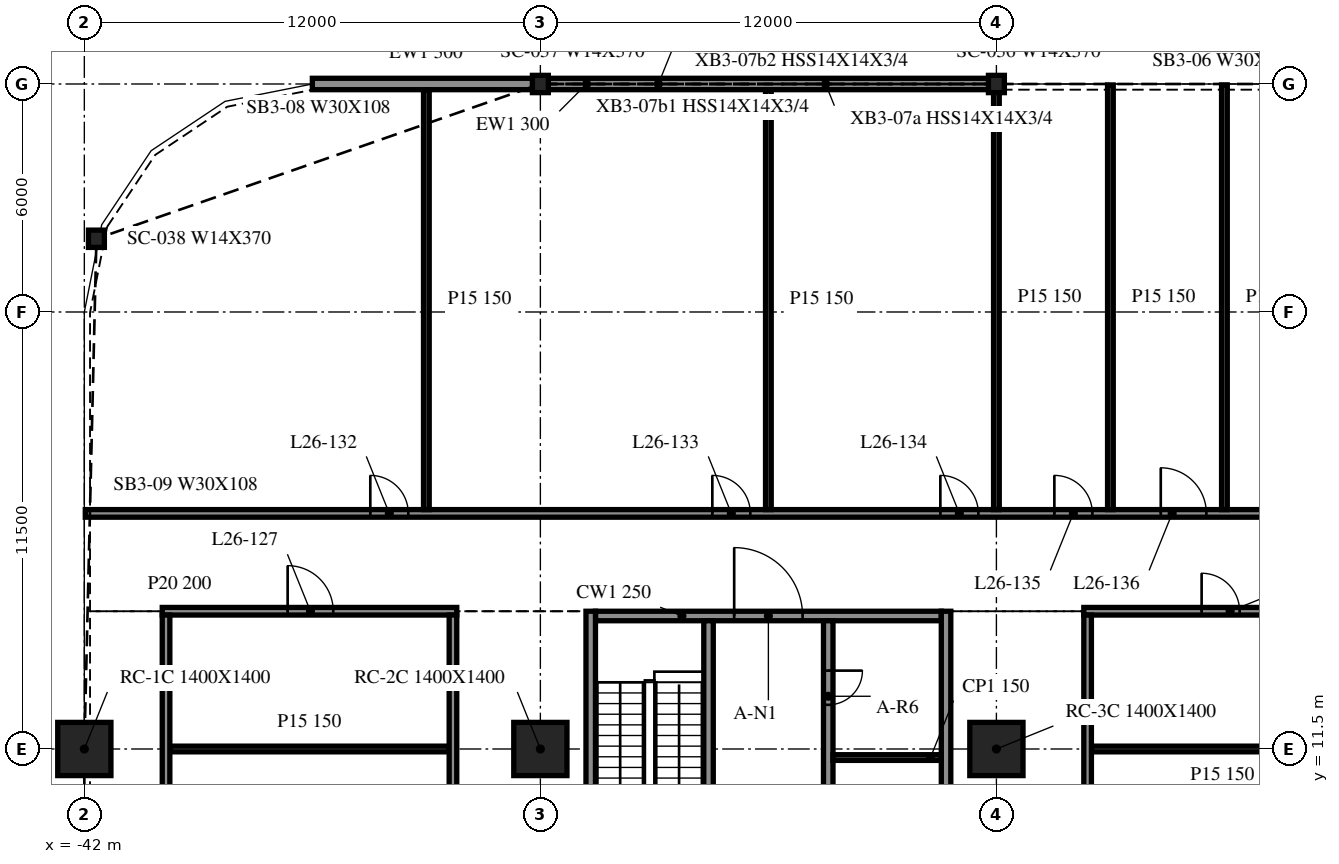
"""IFC4 building model, lengths in metres.
Left out: names, types, materials, properties, quantities, classifications, styles, units other than length and angle.
Written with IfcOpenShell. Run it as: python <this file> out.ifc"""

import sys

from ifc_helpers import new_model, si_unit, direction, frame, frame_2d, origin, origin_2d, place, context, subcontext, project, spatial, rectangle, i_section, extrude, element, fill, save


model = new_model("IFC4")
c1 = context("Model", 3, precision=1e-05, world=origin(), true_north=direction((0.0, 1.0)))
c2 = subcontext(c1, "Body", "Model", "MODEL_VIEW")
j1 = project(units=[si_unit("LENGTHUNIT", "METRE"), si_unit("PLANEANGLEUNIT", "RADIAN")], contexts=[c1])
p1 = place(None, origin())
s1 = spatial("IfcSite", under=j1, at=p1, CompositionType="ELEMENT")
p2 = place(p1, origin())
s2 = spatial("IfcBuilding", under=s1, at=p2, CompositionType="ELEMENT")
p3 = place(p2, frame((0.0, 0.0, 113.5)))
s3 = spatial("IfcBuildingStorey", under=s2, at=p3, CompositionType="ELEMENT", Elevation=113.5)
for number, where, z_axis, x_axis in (
    (1, (-42.0, 11.5, -0.34), (0.0, 0.0, 1.0), (1.0, 0.0, 0.0)),
    (2, (-30.0, 11.5, -0.34), (0.0, 0.0, 1.0), (1.0, 0.0, 0.0)),
    (3, (-18.0, 11.5, -0.34), (0.0, 0.0, 1.0), (1.0, 0.0, 0.0)),
):
    element("IfcColumn", number, at=place(p3, frame(where, z_axis=z_axis, x_axis=x_axis)), inside=s3, PredefinedType="COLUMN", context=c2, shape_type="SweptSolid", body=[
        extrude(rectangle(XDim=1.4, YDim=1.4, at=origin_2d()), origin(), (0.0, 0.0, 1.0), 3.89),
    ])
for number, where, z_axis, x_axis in (
    (4, (-18.0, 29.0, -0.34), (0.0, 0.0, 1.0), (1.0, 0.0, 0.0)),
    (5, (-30.0, 29.0, -0.34), (0.0, 0.0, 1.0), (1.0, 0.0, 0.0)),
    (6, (-41.682, 24.927, -0.34), (0.0, 0.0, 1.0), (1.0, 0.0, 0.0)),
):
    element("IfcColumn", number, at=place(p3, frame(where, z_axis=z_axis, x_axis=x_axis)), inside=s3, PredefinedType="COLUMN", context=c2, shape_type="SweptSolid", body=[
        extrude(i_section(OverallWidth=0.419, OverallDepth=0.455, WebThickness=0.042, FlangeThickness=0.068, at=origin_2d()), origin(), (0.0, 0.0, 1.0), 3.89),
    ])
p4 = place(p3, frame((-18.021, 29.0, 0.0), z_axis=(0.0, 0.0, 1.0), x_axis=(-1.0, 0.0, 0.0)))
e7 = element("IfcWall", 7, at=p4, inside=s3, PredefinedType="NOTDEFINED", context=c2, shape_type="SweptSolid", body=[
    extrude(rectangle(XDim=11.958, YDim=0.3, at=frame_2d((5.979, 0.0))), origin(), (0.0, 0.0, 1.0), 3.55),
])
p5 = place(p3, frame((-30.021, 29.0, 0.0), z_axis=(0.0, 0.0, 1.0), x_axis=(-1.0, 0.0, 0.0)))
e8 = element("IfcWall", 8, at=p5, inside=s3, PredefinedType="NOTDEFINED", context=c2, shape_type="SweptSolid", body=[
    extrude(rectangle(XDim=5.979, YDim=0.3, at=frame_2d((2.99, 0.0))), origin(), (0.0, 0.0, 1.0), 3.55),
])
for number, where, z_axis, x_axis in (
    (9, (-28.675, 15.125, 0.0), (0.0, 0.0, 1.0), (0.0, -1.0, 0.0)),
    (10, (-19.325, -9.125, 0.0), (0.0, 0.0, 1.0), (0.0, 1.0, 0.0)),
):
    element("IfcWall", number, at=place(p3, frame(where, z_axis=z_axis, x_axis=x_axis)), inside=s3, PredefinedType="SOLIDWALL", context=c2, shape_type="SweptSolid", body=[
        extrude(rectangle(XDim=24.25, YDim=0.25, at=frame_2d((12.125, 0.0))), origin(), (0.0, 0.0, 1.0), 3.55),
    ])
p6 = place(p3, frame((-28.55, 15.0, 0.0), z_axis=(0.0, 0.0, 1.0), x_axis=(1.0, 0.0, 0.0)))
e11 = element("IfcWall", 11, at=p6, inside=s3, PredefinedType="SOLIDWALL", context=c2, shape_type="SweptSolid", body=[
    extrude(rectangle(XDim=9.1, YDim=0.25, at=frame_2d((4.55, 0.0))), origin(), (0.0, 0.0, 1.0), 3.55),
])
p7 = place(p6, frame((3.65, 0.0, 0.0)))
e12 = element("IfcOpeningElement", 12, at=p7, cuts=e11, PredefinedType="OPENING", context=c2, shape_type="SweptSolid", body=[
    extrude(rectangle(XDim=1.8, YDim=2.1, at=frame_2d((0.9, 1.05))), frame((0.0, 0.135, 0.0), z_axis=(0.0, -1.0, 0.0), x_axis=(1.0, 0.0, 0.0)), (0.0, 0.0, 1.0), 0.27),
])
p8 = place(p3, frame((-25.575, 14.875, 0.0), z_axis=(0.0, 0.0, 1.0), x_axis=(0.0, -1.0, 0.0)))
e13 = element("IfcWall", 13, at=p8, inside=s3, PredefinedType="SOLIDWALL", context=c2, shape_type="SweptSolid", body=[
    extrude(rectangle(XDim=6.25, YDim=0.25, at=frame_2d((3.125, 0.0))), origin(), (0.0, 0.0, 1.0), 3.55),
])
p9 = place(p8, frame((4.85, 0.0, 0.0)))
e14 = element("IfcOpeningElement", 14, at=p9, cuts=e13, PredefinedType="OPENING", context=c2, shape_type="SweptSolid", body=[
    extrude(rectangle(XDim=1.0, YDim=2.1, at=frame_2d((0.5, 1.05))), frame((0.0, 0.135, 0.0), z_axis=(0.0, -1.0, 0.0), x_axis=(1.0, 0.0, 0.0)), (0.0, 0.0, 1.0), 0.27),
])
p10 = place(p3, frame((-22.425, 14.875, 0.0), z_axis=(0.0, 0.0, 1.0), x_axis=(0.0, -1.0, 0.0)))
e15 = element("IfcWall", 15, at=p10, inside=s3, PredefinedType="SOLIDWALL", context=c2, shape_type="SweptSolid", body=[
    extrude(rectangle(XDim=23.75, YDim=0.25, at=frame_2d((11.875, 0.0))), origin(), (0.0, 0.0, 1.0), 3.55),
])
p11 = place(p10, frame((15.45, 0.0, 0.0)))
e16 = element("IfcOpeningElement", 16, at=p11, cuts=e15, PredefinedType="OPENING", context=c2, shape_type="SweptSolid", body=[
    extrude(rectangle(XDim=1.1, YDim=2.1, at=frame_2d((0.55, 1.05))), frame((0.0, 0.135, 0.0), z_axis=(0.0, -1.0, 0.0), x_axis=(1.0, 0.0, 0.0)), (0.0, 0.0, 1.0), 0.27),
])
p12 = place(p10, frame((12.7, 0.0, 0.0)))
e17 = element("IfcOpeningElement", 17, at=p12, cuts=e15, PredefinedType="OPENING", context=c2, shape_type="SweptSolid", body=[
    extrude(rectangle(XDim=1.1, YDim=2.1, at=frame_2d((0.55, 1.05))), frame((0.0, 0.135, 0.0), z_axis=(0.0, -1.0, 0.0), x_axis=(1.0, 0.0, 0.0)), (0.0, 0.0, 1.0), 0.27),
])
p13 = place(p10, frame((21.337, 0.0, 0.0)))
e18 = element("IfcOpeningElement", 18, at=p13, cuts=e15, PredefinedType="OPENING", context=c2, shape_type="SweptSolid", body=[
    extrude(rectangle(XDim=0.9, YDim=2.1, at=frame_2d((0.45, 1.05))), frame((0.0, 0.135, 0.0), z_axis=(0.0, -1.0, 0.0), x_axis=(1.0, 0.0, 0.0)), (0.0, 0.0, 1.0), 0.27),
])
p14 = place(p10, frame((18.262, 0.0, 0.0)))
e19 = element("IfcOpeningElement", 19, at=p14, cuts=e15, PredefinedType="OPENING", context=c2, shape_type="SweptSolid", body=[
    extrude(rectangle(XDim=0.9, YDim=2.1, at=frame_2d((0.45, 1.05))), frame((0.0, 0.135, 0.0), z_axis=(0.0, -1.0, 0.0), x_axis=(1.0, 0.0, 0.0)), (0.0, 0.0, 1.0), 0.27),
])
p15 = place(p10, frame((4.387, 0.0, 0.0)))
e20 = element("IfcOpeningElement", 20, at=p15, cuts=e15, PredefinedType="OPENING", context=c2, shape_type="SweptSolid", body=[
    extrude(rectangle(XDim=0.9, YDim=2.1, at=frame_2d((0.45, 1.05))), frame((0.0, 0.135, 0.0), z_axis=(0.0, -1.0, 0.0), x_axis=(1.0, 0.0, 0.0)), (0.0, 0.0, 1.0), 0.27),
])
p16 = place(p10, frame((1.312, 0.0, 0.0)))
e21 = element("IfcOpeningElement", 21, at=p16, cuts=e15, PredefinedType="OPENING", context=c2, shape_type="SweptSolid", body=[
    extrude(rectangle(XDim=0.9, YDim=2.1, at=frame_2d((0.45, 1.05))), frame((0.0, 0.135, 0.0), z_axis=(0.0, -1.0, 0.0), x_axis=(1.0, 0.0, 0.0)), (0.0, 0.0, 1.0), 0.27),
])
p17 = place(p3, frame((-22.3, 11.275, 0.0), z_axis=(0.0, 0.0, 1.0), x_axis=(1.0, 0.0, 0.0)))
e22 = element("IfcWall", 22, at=p17, inside=s3, PredefinedType="PARTITIONING", context=c2, shape_type="SweptSolid", body=[
    extrude(rectangle(XDim=2.85, YDim=0.15, at=frame_2d((1.425, 0.0))), origin(), (0.0, 0.0, 1.0), 3.55),
])
p18 = place(p3, frame((-39.75, 11.5, 0.0), z_axis=(0.0, 0.0, 1.0), x_axis=(1.0, 0.0, 0.0)))
e23 = element("IfcWall", 23, at=p18, inside=s3, PredefinedType="PARTITIONING", context=c2, shape_type="SweptSolid", body=[
    extrude(rectangle(XDim=7.35, YDim=0.15, at=frame_2d((3.675, 0.0))), origin(), (0.0, 0.0, 1.0), 2.551),
])
p19 = place(p3, frame((-15.5, 11.5, 0.0), z_axis=(0.0, 0.0, 1.0), x_axis=(1.0, 0.0, 0.0)))
e24 = element("IfcWall", 24, at=p19, inside=s3, PredefinedType="PARTITIONING", context=c2, shape_type="SweptSolid", body=[
    extrude(rectangle(XDim=6.9, YDim=0.15, at=frame_2d((3.45, 0.0))), origin(), (0.0, 0.0, 1.0), 3.55),
])
p20 = place(p3, frame((-39.95, 15.125, 0.0), z_axis=(0.0, 0.0, 1.0), x_axis=(1.0, 0.0, 0.0)))
e25 = element("IfcWall", 25, at=p20, inside=s3, PredefinedType="PARTITIONING", context=c2, shape_type="SweptSolid", body=[
    extrude(rectangle(XDim=7.75, YDim=0.2, at=frame_2d((3.875, 0.0))), origin(), (0.0, 0.0, 1.0), 3.55),
])
p21 = place(p20, frame((3.3, 0.0, 0.0)))
e26 = element("IfcOpeningElement", 26, at=p21, cuts=e25, PredefinedType="OPENING", context=c2, shape_type="SweptSolid", body=[
    extrude(rectangle(XDim=1.2, YDim=2.1, at=frame_2d((0.6, 1.05))), frame((0.0, 0.11, 0.0), z_axis=(0.0, -1.0, 0.0), x_axis=(1.0, 0.0, 0.0)), (0.0, 0.0, 1.0), 0.22),
])
p22 = place(p3, frame((-15.7, 15.125, 0.0), z_axis=(0.0, 0.0, 1.0), x_axis=(1.0, 0.0, 0.0)))
e27 = element("IfcWall", 27, at=p22, inside=s3, PredefinedType="PARTITIONING", context=c2, shape_type="SweptSolid", body=[
    extrude(rectangle(XDim=7.3, YDim=0.2, at=frame_2d((3.65, 0.0))), origin(), (0.0, 0.0, 1.0), 3.55),
])
p23 = place(p22, frame((3.1, 0.0, 0.0)))
e28 = element("IfcOpeningElement", 28, at=p23, cuts=e27, PredefinedType="OPENING", context=c2, shape_type="SweptSolid", body=[
    extrude(rectangle(XDim=1.0, YDim=2.1, at=frame_2d((0.5, 1.05))), frame((0.0, 0.11, 0.0), z_axis=(0.0, -1.0, 0.0), x_axis=(1.0, 0.0, 0.0)), (0.0, 0.0, 1.0), 0.22),
])
p24 = place(p3, frame((-41.975, 17.7, 0.0), z_axis=(0.0, 0.0, 1.0), x_axis=(1.0, 0.0, 0.0)))
e29 = element("IfcWall", 29, at=p24, inside=s3, PredefinedType="PARTITIONING", context=c2, shape_type="SweptSolid", body=[
    extrude(rectangle(XDim=95.95, YDim=0.2, at=frame_2d((47.975, 0.0))), origin(), (0.0, 0.0, 1.0), 3.55),
])
p25 = place(p24, frame((7.5, 0.0, 0.0)))
e30 = element("IfcOpeningElement", 30, at=p25, cuts=e29, PredefinedType="OPENING", context=c2, shape_type="SweptSolid", body=[
    extrude(rectangle(XDim=1.0, YDim=2.1, at=frame_2d((0.5, 1.05))), frame((0.0, 0.11, 0.0), z_axis=(0.0, -1.0, 0.0), x_axis=(1.0, 0.0, 0.0)), (0.0, 0.0, 1.0), 0.22),
])
p26 = place(p24, frame((16.5, 0.0, 0.0)))
e31 = element("IfcOpeningElement", 31, at=p26, cuts=e29, PredefinedType="OPENING", context=c2, shape_type="SweptSolid", body=[
    extrude(rectangle(XDim=1.0, YDim=2.1, at=frame_2d((0.5, 1.05))), frame((0.0, 0.11, 0.0), z_axis=(0.0, -1.0, 0.0), x_axis=(1.0, 0.0, 0.0)), (0.0, 0.0, 1.0), 0.22),
])
p27 = place(p24, frame((22.5, 0.0, 0.0)))
e32 = element("IfcOpeningElement", 32, at=p27, cuts=e29, PredefinedType="OPENING", context=c2, shape_type="SweptSolid", body=[
    extrude(rectangle(XDim=1.0, YDim=2.1, at=frame_2d((0.5, 1.05))), frame((0.0, 0.11, 0.0), z_axis=(0.0, -1.0, 0.0), x_axis=(1.0, 0.0, 0.0)), (0.0, 0.0, 1.0), 0.22),
])
p28 = place(p24, frame((25.5, 0.0, 0.0)))
e33 = element("IfcOpeningElement", 33, at=p28, cuts=e29, PredefinedType="OPENING", context=c2, shape_type="SweptSolid", body=[
    extrude(rectangle(XDim=1.0, YDim=2.1, at=frame_2d((0.5, 1.05))), frame((0.0, 0.11, 0.0), z_axis=(0.0, -1.0, 0.0), x_axis=(1.0, 0.0, 0.0)), (0.0, 0.0, 1.0), 0.22),
])
p29 = place(p24, frame((28.3, 0.0, 0.0)))
e34 = element("IfcOpeningElement", 34, at=p29, cuts=e29, PredefinedType="OPENING", context=c2, shape_type="SweptSolid", body=[
    extrude(rectangle(XDim=1.2, YDim=2.1, at=frame_2d((0.6, 1.05))), frame((0.0, 0.11, 0.0), z_axis=(0.0, -1.0, 0.0), x_axis=(1.0, 0.0, 0.0)), (0.0, 0.0, 1.0), 0.22),
])
p30 = place(p24, frame((37.5, 0.0, 0.0)))
e35 = element("IfcOpeningElement", 35, at=p30, cuts=e29, PredefinedType="OPENING", context=c2, shape_type="SweptSolid", body=[
    extrude(rectangle(XDim=1.0, YDim=2.1, at=frame_2d((0.5, 1.05))), frame((0.0, 0.11, 0.0), z_axis=(0.0, -1.0, 0.0), x_axis=(1.0, 0.0, 0.0)), (0.0, 0.0, 1.0), 0.22),
])
p31 = place(p24, frame((46.5, 0.0, 0.0)))
e36 = element("IfcOpeningElement", 36, at=p31, cuts=e29, PredefinedType="OPENING", context=c2, shape_type="SweptSolid", body=[
    extrude(rectangle(XDim=1.0, YDim=2.1, at=frame_2d((0.5, 1.05))), frame((0.0, 0.11, 0.0), z_axis=(0.0, -1.0, 0.0), x_axis=(1.0, 0.0, 0.0)), (0.0, 0.0, 1.0), 0.22),
])
p32 = place(p24, frame((48.1, 0.0, 0.0)))
e37 = element("IfcOpeningElement", 37, at=p32, cuts=e29, PredefinedType="OPENING", context=c2, shape_type="SweptSolid", body=[
    extrude(rectangle(XDim=1.0, YDim=2.1, at=frame_2d((0.5, 1.05))), frame((0.0, 0.11, 0.0), z_axis=(0.0, -1.0, 0.0), x_axis=(1.0, 0.0, 0.0)), (0.0, 0.0, 1.0), 0.22),
])
p33 = place(p24, frame((54.1, 0.0, 0.0)))
e38 = element("IfcOpeningElement", 38, at=p33, cuts=e29, PredefinedType="OPENING", context=c2, shape_type="SweptSolid", body=[
    extrude(rectangle(XDim=1.0, YDim=2.1, at=frame_2d((0.5, 1.05))), frame((0.0, 0.11, 0.0), z_axis=(0.0, -1.0, 0.0), x_axis=(1.0, 0.0, 0.0)), (0.0, 0.0, 1.0), 0.22),
])
p34 = place(p24, frame((57.1, 0.0, 0.0)))
e39 = element("IfcOpeningElement", 39, at=p34, cuts=e29, PredefinedType="OPENING", context=c2, shape_type="SweptSolid", body=[
    extrude(rectangle(XDim=1.0, YDim=2.1, at=frame_2d((0.5, 1.05))), frame((0.0, 0.11, 0.0), z_axis=(0.0, -1.0, 0.0), x_axis=(1.0, 0.0, 0.0)), (0.0, 0.0, 1.0), 0.22),
])
p35 = place(p24, frame((60.1, 0.0, 0.0)))
e40 = element("IfcOpeningElement", 40, at=p35, cuts=e29, PredefinedType="OPENING", context=c2, shape_type="SweptSolid", body=[
    extrude(rectangle(XDim=1.2, YDim=2.1, at=frame_2d((0.6, 1.05))), frame((0.0, 0.11, 0.0), z_axis=(0.0, -1.0, 0.0), x_axis=(1.0, 0.0, 0.0)), (0.0, 0.0, 1.0), 0.22),
])
p36 = place(p24, frame((69.1, 0.0, 0.0)))
e41 = element("IfcOpeningElement", 41, at=p36, cuts=e29, PredefinedType="OPENING", context=c2, shape_type="SweptSolid", body=[
    extrude(rectangle(XDim=1.0, YDim=2.1, at=frame_2d((0.5, 1.05))), frame((0.0, 0.11, 0.0), z_axis=(0.0, -1.0, 0.0), x_axis=(1.0, 0.0, 0.0)), (0.0, 0.0, 1.0), 0.22),
])
p37 = place(p24, frame((78.1, 0.0, 0.0)))
e42 = element("IfcOpeningElement", 42, at=p37, cuts=e29, PredefinedType="OPENING", context=c2, shape_type="SweptSolid", body=[
    extrude(rectangle(XDim=1.0, YDim=2.1, at=frame_2d((0.5, 1.05))), frame((0.0, 0.11, 0.0), z_axis=(0.0, -1.0, 0.0), x_axis=(1.0, 0.0, 0.0)), (0.0, 0.0, 1.0), 0.22),
])
p38 = place(p24, frame((84.1, 0.0, 0.0)))
e43 = element("IfcOpeningElement", 43, at=p38, cuts=e29, PredefinedType="OPENING", context=c2, shape_type="SweptSolid", body=[
    extrude(rectangle(XDim=1.0, YDim=2.1, at=frame_2d((0.5, 1.05))), frame((0.0, 0.11, 0.0), z_axis=(0.0, -1.0, 0.0), x_axis=(1.0, 0.0, 0.0)), (0.0, 0.0, 1.0), 0.22),
])
p39 = place(p24, frame((87.1, 0.0, 0.0)))
e44 = element("IfcOpeningElement", 44, at=p39, cuts=e29, PredefinedType="OPENING", context=c2, shape_type="SweptSolid", body=[
    extrude(rectangle(XDim=1.0, YDim=2.1, at=frame_2d((0.5, 1.05))), frame((0.0, 0.11, 0.0), z_axis=(0.0, -1.0, 0.0), x_axis=(1.0, 0.0, 0.0)), (0.0, 0.0, 1.0), 0.22),
])
p40 = place(p24, frame((90.1, 0.0, 0.0)))
e45 = element("IfcOpeningElement", 45, at=p40, cuts=e29, PredefinedType="OPENING", context=c2, shape_type="SweptSolid", body=[
    extrude(rectangle(XDim=1.0, YDim=2.1, at=frame_2d((0.5, 1.05))), frame((0.0, 0.11, 0.0), z_axis=(0.0, -1.0, 0.0), x_axis=(1.0, 0.0, 0.0)), (0.0, 0.0, 1.0), 0.22),
])
p41 = place(p3, frame((-39.85, -9.025, 0.0), z_axis=(0.0, 0.0, 1.0), x_axis=(0.0, 1.0, 0.0)))
e46 = element("IfcWall", 46, at=p41, inside=s3, PredefinedType="PARTITIONING", context=c2, shape_type="SweptSolid", body=[
    extrude(rectangle(XDim=24.05, YDim=0.2, at=frame_2d((12.025, 0.0))), origin(), (0.0, 0.0, 1.0), 3.55),
])
p42 = place(p41, frame((12.3, 0.0, 0.0)))
e47 = element("IfcOpeningElement", 47, at=p42, cuts=e46, PredefinedType="OPENING", context=c2, shape_type="SweptSolid", body=[
    extrude(rectangle(XDim=1.2, YDim=2.1, at=frame_2d((0.6, 1.05))), frame((0.0, 0.11, 0.0), z_axis=(0.0, -1.0, 0.0), x_axis=(1.0, 0.0, 0.0)), (0.0, 0.0, 1.0), 0.22),
])
p43 = place(p3, frame((-33.0, 17.8, 0.0), z_axis=(0.0, 0.0, 1.0), x_axis=(0.0, 1.0, 0.0)))
e48 = element("IfcWall", 48, at=p43, inside=s3, PredefinedType="PARTITIONING", context=c2, shape_type="SweptSolid", body=[
    extrude(rectangle(XDim=11.05, YDim=0.15, at=frame_2d((5.525, 0.0))), origin(), (0.0, 0.0, 1.0), 3.55),
])
p44 = place(p3, frame((-32.3, -9.025, 0.0), z_axis=(0.0, 0.0, 1.0), x_axis=(0.0, 1.0, 0.0)))
e49 = element("IfcWall", 49, at=p44, inside=s3, PredefinedType="PARTITIONING", context=c2, shape_type="SweptSolid", body=[
    extrude(rectangle(XDim=24.05, YDim=0.2, at=frame_2d((12.025, 0.0))), origin(), (0.0, 0.0, 1.0), 3.55),
])
p45 = place(p3, frame((-24.0, 17.8, 0.0), z_axis=(0.0, 0.0, 1.0), x_axis=(0.0, 1.0, 0.0)))
e50 = element("IfcWall", 50, at=p45, inside=s3, PredefinedType="PARTITIONING", context=c2, shape_type="SweptSolid", body=[
    extrude(rectangle(XDim=11.05, YDim=0.15, at=frame_2d((5.525, 0.0))), origin(), (0.0, 0.0, 1.0), 3.55),
])
p46 = place(p3, frame((-18.0, 17.8, 0.0), z_axis=(0.0, 0.0, 1.0), x_axis=(0.0, 1.0, 0.0)))
e51 = element("IfcWall", 51, at=p46, inside=s3, PredefinedType="PARTITIONING", context=c2, shape_type="SweptSolid", body=[
    extrude(rectangle(XDim=11.175, YDim=0.15, at=frame_2d((5.587, 0.0))), origin(), (0.0, 0.0, 1.0), 3.55),
])
p47 = place(p3, frame((-15.6, -9.025, 0.0), z_axis=(0.0, 0.0, 1.0), x_axis=(0.0, 1.0, 0.0)))
e52 = element("IfcWall", 52, at=p47, inside=s3, PredefinedType="PARTITIONING", context=c2, shape_type="SweptSolid", body=[
    extrude(rectangle(XDim=24.05, YDim=0.2, at=frame_2d((12.025, 0.0))), origin(), (0.0, 0.0, 1.0), 3.55),
])
p48 = place(p47, frame((12.3, 0.0, 0.0)))
e53 = element("IfcOpeningElement", 53, at=p48, cuts=e52, PredefinedType="OPENING", context=c2, shape_type="SweptSolid", body=[
    extrude(rectangle(XDim=1.0, YDim=2.1, at=frame_2d((0.5, 1.05))), frame((0.0, 0.11, 0.0), z_axis=(0.0, -1.0, 0.0), x_axis=(1.0, 0.0, 0.0)), (0.0, 0.0, 1.0), 0.22),
])
for number, where, z_axis, x_axis in (
    (54, (-15.0, 17.8, 0.0), (0.0, 0.0, 1.0), (0.0, 1.0, 0.0)),
    (55, (-12.0, 17.8, 0.0), (0.0, 0.0, 1.0), (0.0, 1.0, 0.0)),
):
    element("IfcWall", number, at=place(p3, frame(where, z_axis=z_axis, x_axis=x_axis)), inside=s3, PredefinedType="PARTITIONING", context=c2, shape_type="SweptSolid", body=[
        extrude(rectangle(XDim=11.175, YDim=0.15, at=frame_2d((5.587, 0.0))), origin(), (0.0, 0.0, 1.0), 3.55),
    ])
p49 = place(p7, origin())
e56 = element("IfcDoor", 56, at=p49, inside=s3, OperationType="DOUBLE_DOOR_SINGLE_SWING", PredefinedType="DOOR", context=c2, shape_type="SweptSolid", body=[
    extrude(rectangle(XDim=1.8, YDim=2.1, at=frame_2d((0.9, 1.05))), frame((0.0, 0.025, 0.0), z_axis=(0.0, -1.0, 0.0), x_axis=(1.0, 0.0, 0.0)), (0.0, 0.0, 1.0), 0.05),
])
fill(e12, e56)
p50 = place(p16, origin())
e57 = element("IfcDoor", 57, at=p50, inside=s3, OperationType="SINGLE_SWING_RIGHT", PredefinedType="DOOR", context=c2, shape_type="SweptSolid", body=[
    extrude(rectangle(XDim=0.9, YDim=2.1, at=frame_2d((0.45, 1.05))), frame((0.0, 0.025, 0.0), z_axis=(0.0, -1.0, 0.0), x_axis=(1.0, 0.0, 0.0)), (0.0, 0.0, 1.0), 0.05),
])
fill(e21, e57)
p51 = place(p21, origin())
e58 = element("IfcDoor", 58, at=p51, inside=s3, OperationType="SINGLE_SWING_LEFT", PredefinedType="DOOR", context=c2, shape_type="SweptSolid", body=[
    extrude(rectangle(XDim=1.2, YDim=2.1, at=frame_2d((0.6, 1.05))), frame((0.0, 0.025, 0.0), z_axis=(0.0, -1.0, 0.0), x_axis=(1.0, 0.0, 0.0)), (0.0, 0.0, 1.0), 0.05),
])
fill(e26, e58)
p52 = place(p23, origin())
e59 = element("IfcDoor", 59, at=p52, inside=s3, OperationType="SINGLE_SWING_RIGHT", PredefinedType="DOOR", context=c2, shape_type="SweptSolid", body=[
    extrude(rectangle(XDim=1.0, YDim=2.1, at=frame_2d((0.5, 1.05))), frame((0.0, 0.025, 0.0), z_axis=(0.0, -1.0, 0.0), x_axis=(1.0, 0.0, 0.0)), (0.0, 0.0, 1.0), 0.05),
])
fill(e28, e59)
p53 = place(p25, origin())
e60 = element("IfcDoor", 60, at=p53, inside=s3, OperationType="SINGLE_SWING_LEFT", PredefinedType="DOOR", context=c2, shape_type="SweptSolid", body=[
    extrude(rectangle(XDim=1.0, YDim=2.1, at=frame_2d((0.5, 1.05))), frame((0.0, 0.025, 0.0), z_axis=(0.0, -1.0, 0.0), x_axis=(1.0, 0.0, 0.0)), (0.0, 0.0, 1.0), 0.05),
])
fill(e30, e60)
p54 = place(p26, origin())
e61 = element("IfcDoor", 61, at=p54, inside=s3, OperationType="SINGLE_SWING_LEFT", PredefinedType="DOOR", context=c2, shape_type="SweptSolid", body=[
    extrude(rectangle(XDim=1.0, YDim=2.1, at=frame_2d((0.5, 1.05))), frame((0.0, 0.025, 0.0), z_axis=(0.0, -1.0, 0.0), x_axis=(1.0, 0.0, 0.0)), (0.0, 0.0, 1.0), 0.05),
])
fill(e31, e61)
p55 = place(p27, origin())
e62 = element("IfcDoor", 62, at=p55, inside=s3, OperationType="SINGLE_SWING_LEFT", PredefinedType="DOOR", context=c2, shape_type="SweptSolid", body=[
    extrude(rectangle(XDim=1.0, YDim=2.1, at=frame_2d((0.5, 1.05))), frame((0.0, 0.025, 0.0), z_axis=(0.0, -1.0, 0.0), x_axis=(1.0, 0.0, 0.0)), (0.0, 0.0, 1.0), 0.05),
])
fill(e32, e62)
p56 = place(p28, origin())
e63 = element("IfcDoor", 63, at=p56, inside=s3, OperationType="SINGLE_SWING_LEFT", PredefinedType="DOOR", context=c2, shape_type="SweptSolid", body=[
    extrude(rectangle(XDim=1.0, YDim=2.1, at=frame_2d((0.5, 1.05))), frame((0.0, 0.025, 0.0), z_axis=(0.0, -1.0, 0.0), x_axis=(1.0, 0.0, 0.0)), (0.0, 0.0, 1.0), 0.05),
])
fill(e33, e63)
p57 = place(p29, origin())
e64 = element("IfcDoor", 64, at=p57, inside=s3, OperationType="SINGLE_SWING_LEFT", PredefinedType="DOOR", context=c2, shape_type="SweptSolid", body=[
    extrude(rectangle(XDim=1.2, YDim=2.1, at=frame_2d((0.6, 1.05))), frame((0.0, 0.025, 0.0), z_axis=(0.0, -1.0, 0.0), x_axis=(1.0, 0.0, 0.0)), (0.0, 0.0, 1.0), 0.05),
])
fill(e34, e64)
save(model, sys.argv[1])
